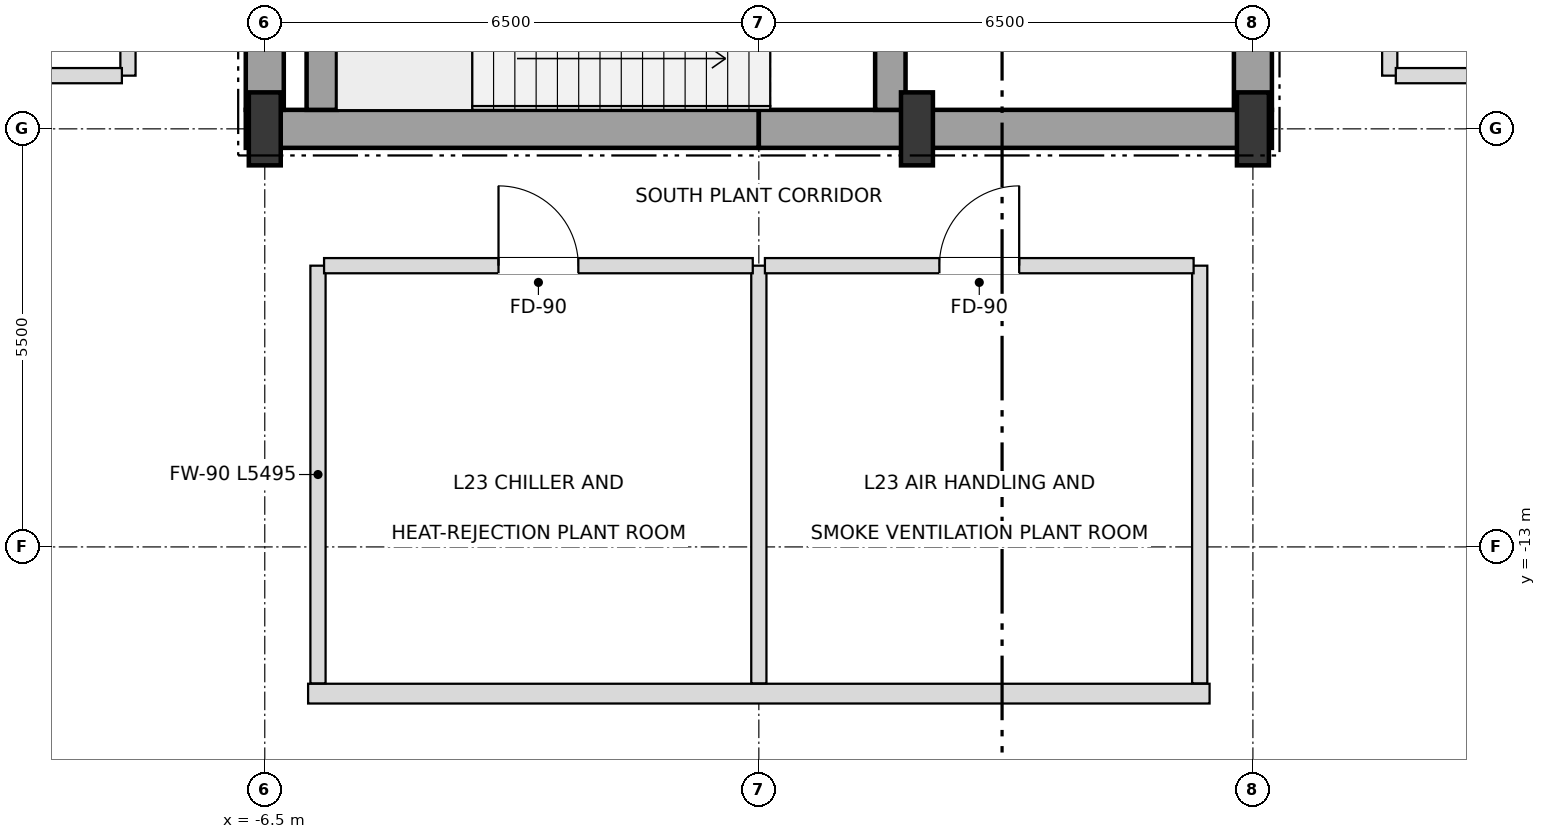
"""IFC4 building model, lengths in metres.
Left out: names, types, materials, properties, quantities, classifications, styles, units other than length and angle.
Written with IfcOpenShell. Run it as: python <this file> out.ifc"""

import sys

from ifc_helpers import new_model, si_unit, direction, frame, frame_2d, origin, origin_2d, place, context, subcontext, project, spatial, rectangle, i_section, extrude, element, fill, save


model = new_model("IFC4")
c1 = context("Model", 3, precision=1e-05, world=origin(), true_north=direction((0.0, 1.0)))
c2 = subcontext(c1, "Body", "Model", "MODEL_VIEW")
j1 = project(units=[si_unit("LENGTHUNIT", "METRE"), si_unit("PLANEANGLEUNIT", "RADIAN")], contexts=[c1])
p1 = place(None, origin())
s1 = spatial("IfcSite", under=j1, at=p1, CompositionType="ELEMENT")
p2 = place(p1, origin())
s2 = spatial("IfcBuilding", under=s1, at=p2, CompositionType="ELEMENT")
p3 = place(p2, frame((0.0, 0.0, 93.6)))
s3 = spatial("IfcBuildingStorey", under=s2, at=p3, CompositionType="ELEMENT", Elevation=93.6)
for number, where, z_axis, x_axis in (
    (1, (-6.5, -7.5, 0.0), (0.0, 0.0, 1.0), (1.0, 0.0, 0.0)),
    (2, (2.08, -7.5, 0.0), (0.0, 0.0, 1.0), (1.0, 0.0, 0.0)),
    (3, (6.5, -7.5, 0.0), (0.0, 0.0, 1.0), (1.0, 0.0, 0.0)),
):
    element("IfcColumn", number, at=place(p3, frame(where, z_axis=z_axis, x_axis=x_axis)), inside=s3, PredefinedType="COLUMN", context=c2, shape_type="SweptSolid", body=[
        extrude(i_section(OverallWidth=0.42, OverallDepth=0.96, WebThickness=0.022, FlangeThickness=0.034, at=origin_2d()), origin(), (0.0, 0.0, 1.0), 5.4),
    ])
p4 = place(p3, frame((-5.93, -14.93, 0.0), z_axis=(0.0, 0.0, 1.0), x_axis=(1.0, 0.0, 0.0)))
e4 = element("IfcWall", 4, at=p4, inside=s3, PredefinedType="SOLIDWALL", context=c2, shape_type="SweptSolid", body=[
    extrude(rectangle(XDim=11.86, YDim=0.26, at=frame_2d((5.93, 0.0))), origin(), (0.0, 0.0, 1.0), 5.1),
])
for number, where, z_axis, x_axis in (
    (5, (-6.75, -7.5, 0.0), (0.0, 0.0, 1.0), (1.0, 0.0, 0.0)),
    (6, (0.0, -7.5, 0.0), (0.0, 0.0, 1.0), (1.0, 0.0, 0.0)),
):
    element("IfcWall", number, at=place(p3, frame(where, z_axis=z_axis, x_axis=x_axis)), inside=s3, PredefinedType="SHEAR", context=c2, shape_type="SweptSolid", body=[
        extrude(rectangle(XDim=6.75, YDim=0.5, at=frame_2d((3.375, 0.0))), origin(), (0.0, 0.0, 1.0), 5.1),
    ])
p5 = place(p3, frame((-6.5, -7.25, 0.0), z_axis=(0.0, 0.0, 1.0), x_axis=(0.0, 1.0, 0.0)))
e7 = element("IfcWall", 7, at=p5, inside=s3, PredefinedType="SHEAR", context=c2, shape_type="SweptSolid", body=[
    extrude(rectangle(XDim=3.55, YDim=0.5, at=frame_2d((1.775, 0.0))), origin(), (0.0, 0.0, 1.0), 5.1),
])
p6 = place(p3, frame((6.5, -7.25, 0.0), z_axis=(0.0, 0.0, 1.0), x_axis=(0.0, 1.0, 0.0)))
e8 = element("IfcWall", 8, at=p6, inside=s3, PredefinedType="SHEAR", context=c2, shape_type="SweptSolid", body=[
    extrude(rectangle(XDim=5.75, YDim=0.5, at=frame_2d((2.875, 0.0))), origin(), (0.0, 0.0, 1.0), 5.1),
])
p7 = place(p6, frame((0.85, 0.0, 0.0)))
e9 = element("IfcOpeningElement", 9, at=p7, cuts=e8, PredefinedType="OPENING", context=c2, shape_type="SweptSolid", body=[
    extrude(rectangle(XDim=1.05, YDim=2.15, at=frame_2d((0.525, 1.075))), frame((0.0, 0.26, 0.0), z_axis=(0.0, -1.0, 0.0), x_axis=(1.0, 0.0, 0.0)), (0.0, 0.0, 1.0), 0.52),
])
p8 = place(p3, frame((-5.75, -7.25, 0.0), z_axis=(0.0, 0.0, 1.0), x_axis=(0.0, 1.0, 0.0)))
e10 = element("IfcWall", 10, at=p8, inside=s3, PredefinedType="SHEAR", context=c2, shape_type="SweptSolid", body=[
    extrude(rectangle(XDim=2.9, YDim=0.4, at=frame_2d((1.45, 0.0))), origin(), (0.0, 0.0, 1.0), 5.1),
])
p9 = place(p3, frame((1.73, -7.25, 0.0), z_axis=(0.0, 0.0, 1.0), x_axis=(0.0, 1.0, 0.0)))
e11 = element("IfcWall", 11, at=p9, inside=s3, PredefinedType="SHEAR", context=c2, shape_type="SweptSolid", body=[
    extrude(rectangle(XDim=3.3, YDim=0.4, at=frame_2d((1.65, 0.0))), origin(), (0.0, 0.0, 1.0), 5.1),
])
p10 = place(p9, frame((0.9, 0.0, 0.0)))
e12 = element("IfcOpeningElement", 12, at=p10, cuts=e11, PredefinedType="OPENING", context=c2, shape_type="SweptSolid", body=[
    extrude(rectangle(XDim=1.05, YDim=2.15, at=frame_2d((0.525, 1.075))), frame((0.0, 0.21, 0.0), z_axis=(0.0, -1.0, 0.0), x_axis=(1.0, 0.0, 0.0)), (0.0, 0.0, 1.0), 0.42),
])
p11 = place(p3, frame((-8.3, -6.8, 0.0), z_axis=(0.0, 0.0, 1.0), x_axis=(0.0, 1.0, 0.0)))
e13 = element("IfcWall", 13, at=p11, inside=s3, PredefinedType="SOLIDWALL", context=c2, shape_type="SweptSolid", body=[
    extrude(rectangle(XDim=13.6, YDim=0.2, at=frame_2d((6.8, 0.0))), origin(), (0.0, 0.0, 1.0), 5.1),
])
p12 = place(p11, frame((6.275, 0.0, 0.0)))
e14 = element("IfcOpeningElement", 14, at=p12, cuts=e13, PredefinedType="OPENING", context=c2, shape_type="SweptSolid", body=[
    extrude(rectangle(XDim=1.05, YDim=2.15, at=frame_2d((0.525, 1.075))), frame((0.0, 0.11, 0.0), z_axis=(0.0, -1.0, 0.0), x_axis=(1.0, 0.0, 0.0)), (0.0, 0.0, 1.0), 0.22),
])
for number, where, z_axis, x_axis in (
    (15, (-5.8, -14.795, 0.0), (0.0, 0.0, 1.0), (0.0, 1.0, 0.0)),
    (16, (0.0, -14.795, 0.0), (0.0, 0.0, 1.0), (0.0, 1.0, 0.0)),
    (17, (5.8, -14.795, 0.0), (0.0, 0.0, 1.0), (0.0, 1.0, 0.0)),
):
    element("IfcWall", number, at=place(p3, frame(where, z_axis=z_axis, x_axis=x_axis)), inside=s3, PredefinedType="SOLIDWALL", context=c2, shape_type="SweptSolid", body=[
        extrude(rectangle(XDim=5.495, YDim=0.2, at=frame_2d((2.748, 0.0))), origin(), (0.0, 0.0, 1.0), 5.1),
    ])
p13 = place(p3, frame((8.3, -6.8, 0.0), z_axis=(0.0, 0.0, 1.0), x_axis=(0.0, 1.0, 0.0)))
e18 = element("IfcWall", 18, at=p13, inside=s3, PredefinedType="SOLIDWALL", context=c2, shape_type="SweptSolid", body=[
    extrude(rectangle(XDim=13.6, YDim=0.2, at=frame_2d((6.8, 0.0))), origin(), (0.0, 0.0, 1.0), 5.1),
])
p14 = place(p13, frame((6.275, 0.0, 0.0)))
e19 = element("IfcOpeningElement", 19, at=p14, cuts=e18, PredefinedType="OPENING", context=c2, shape_type="SweptSolid", body=[
    extrude(rectangle(XDim=1.05, YDim=2.15, at=frame_2d((0.525, 1.075))), frame((0.0, 0.11, 0.0), z_axis=(0.0, -1.0, 0.0), x_axis=(1.0, 0.0, 0.0)), (0.0, 0.0, 1.0), 0.22),
])
p15 = place(p3, frame((-5.72, -9.3, 0.0), z_axis=(0.0, 0.0, 1.0), x_axis=(1.0, 0.0, 0.0)))
e20 = element("IfcWall", 20, at=p15, inside=s3, PredefinedType="SOLIDWALL", context=c2, shape_type="SweptSolid", body=[
    extrude(rectangle(XDim=5.64, YDim=0.2, at=frame_2d((2.82, 0.0))), origin(), (0.0, 0.0, 1.0), 5.1),
])
p16 = place(p15, frame((2.295, 0.0, 0.0)))
e21 = element("IfcOpeningElement", 21, at=p16, cuts=e20, PredefinedType="OPENING", context=c2, shape_type="SweptSolid", body=[
    extrude(rectangle(XDim=1.05, YDim=2.15, at=frame_2d((0.525, 1.075))), frame((0.0, 0.11, 0.0), z_axis=(0.0, -1.0, 0.0), x_axis=(1.0, 0.0, 0.0)), (0.0, 0.0, 1.0), 0.22),
])
p17 = place(p3, frame((0.08, -9.3, 0.0), z_axis=(0.0, 0.0, 1.0), x_axis=(1.0, 0.0, 0.0)))
e22 = element("IfcWall", 22, at=p17, inside=s3, PredefinedType="SOLIDWALL", context=c2, shape_type="SweptSolid", body=[
    extrude(rectangle(XDim=5.64, YDim=0.2, at=frame_2d((2.82, 0.0))), origin(), (0.0, 0.0, 1.0), 5.1),
])
p18 = place(p17, frame((2.295, 0.0, 0.0)))
e23 = element("IfcOpeningElement", 23, at=p18, cuts=e22, PredefinedType="OPENING", context=c2, shape_type="SweptSolid", body=[
    extrude(rectangle(XDim=1.05, YDim=2.15, at=frame_2d((0.525, 1.075))), frame((0.0, 0.11, 0.0), z_axis=(0.0, -1.0, 0.0), x_axis=(1.0, 0.0, 0.0)), (0.0, 0.0, 1.0), 0.22),
])
for number, where, z_axis, x_axis in (
    (24, (-16.195, -6.8, 0.0), (0.0, 0.0, 1.0), (1.0, 0.0, 0.0)),
    (25, (8.38, -6.8, 0.0), (0.0, 0.0, 1.0), (1.0, 0.0, 0.0)),
):
    element("IfcWall", number, at=place(p3, frame(where, z_axis=z_axis, x_axis=x_axis)), inside=s3, PredefinedType="SOLIDWALL", context=c2, shape_type="SweptSolid", body=[
        extrude(rectangle(XDim=7.815, YDim=0.2, at=frame_2d((3.908, 0.0))), origin(), (0.0, 0.0, 1.0), 5.1),
    ])
p19 = place(p16, origin())
e26 = element("IfcDoor", 26, at=p19, inside=s3, OperationType="SINGLE_SWING_LEFT", PredefinedType="DOOR", context=c2, shape_type="SweptSolid", body=[
    extrude(rectangle(XDim=1.05, YDim=2.15, at=frame_2d((0.525, 1.075))), frame((0.0, 0.025, 0.0), z_axis=(0.0, -1.0, 0.0), x_axis=(1.0, 0.0, 0.0)), (0.0, 0.0, 1.0), 0.05),
])
fill(e21, e26)
p20 = place(p18, origin())
e27 = element("IfcDoor", 27, at=p20, inside=s3, OperationType="SINGLE_SWING_RIGHT", PredefinedType="DOOR", context=c2, shape_type="SweptSolid", body=[
    extrude(rectangle(XDim=1.05, YDim=2.15, at=frame_2d((0.525, 1.075))), frame((0.0, 0.025, 0.0), z_axis=(0.0, -1.0, 0.0), x_axis=(1.0, 0.0, 0.0)), (0.0, 0.0, 1.0), 0.05),
])
fill(e23, e27)
save(model, sys.argv[1])
